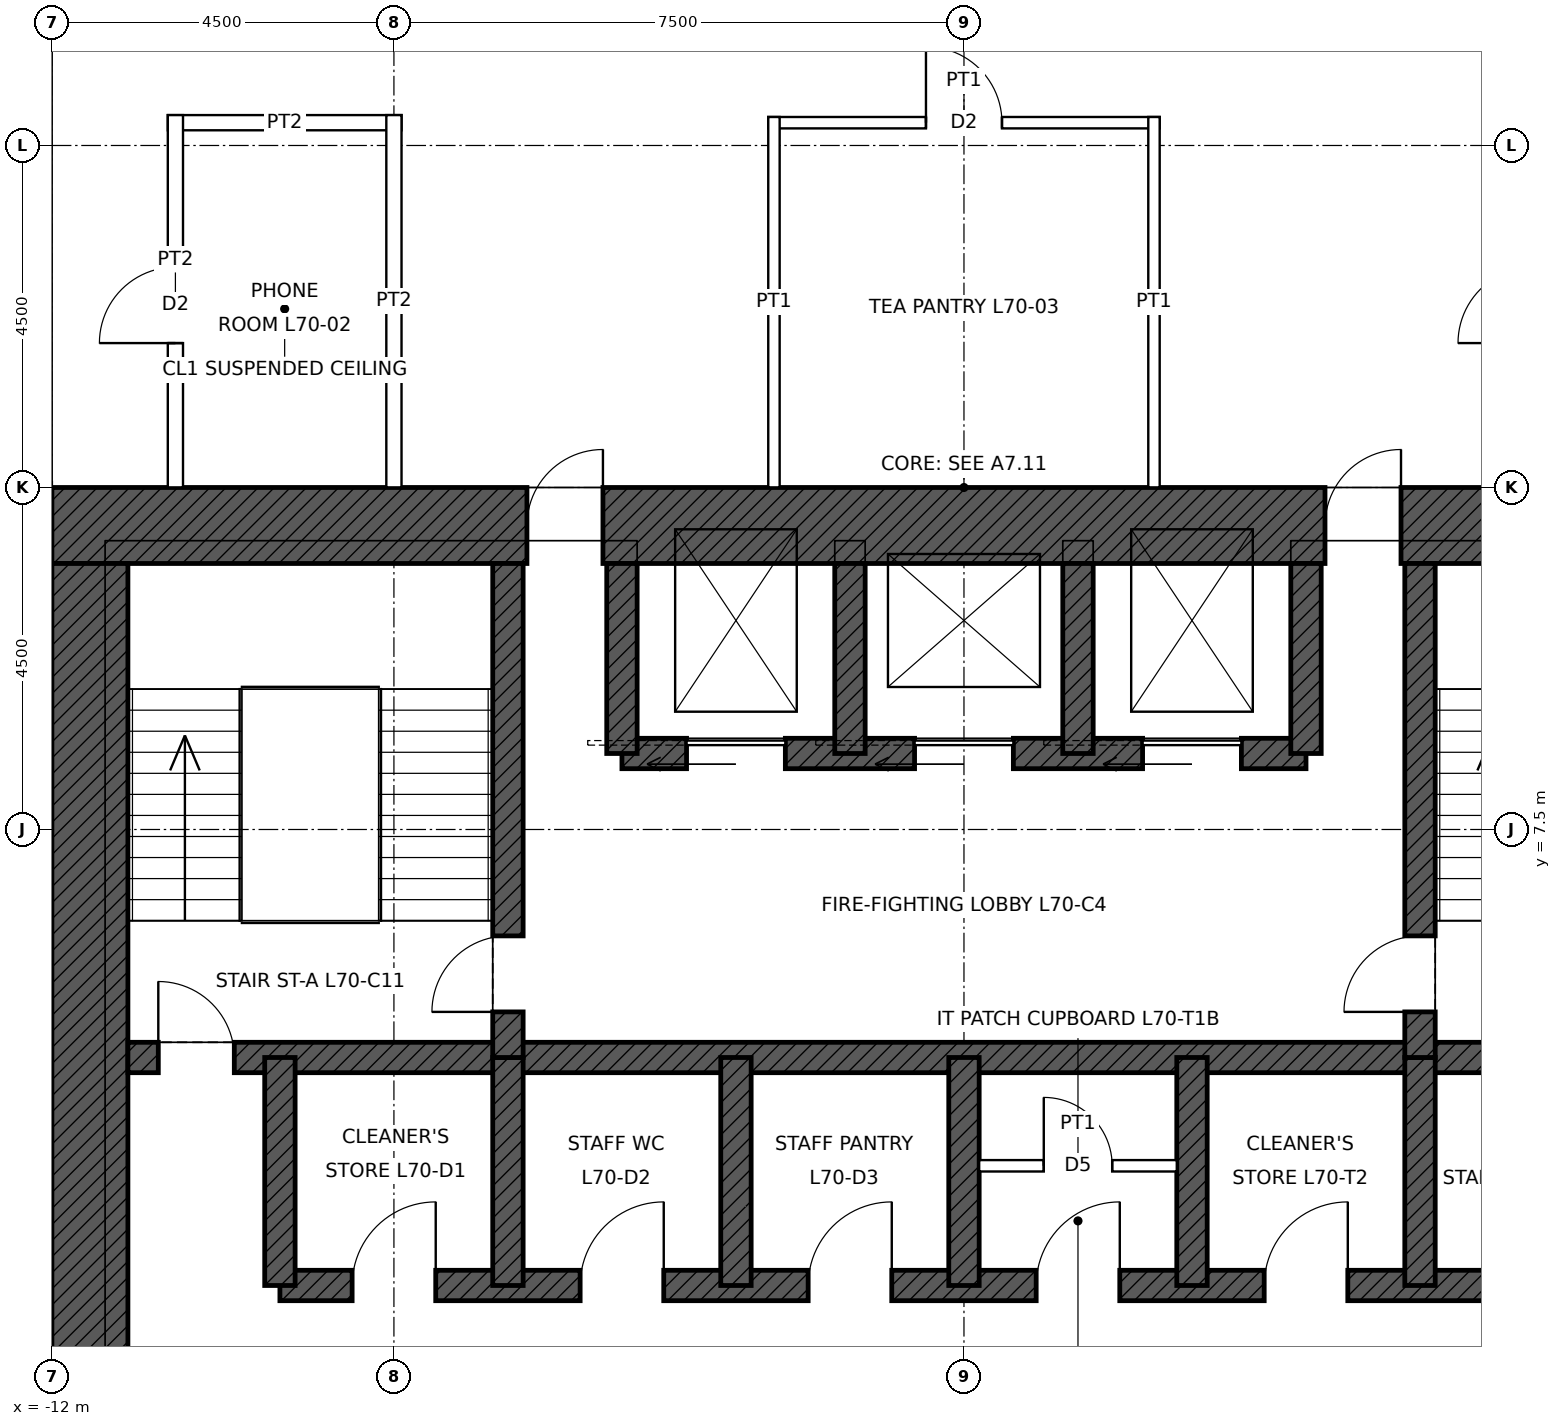
"""IFC4 building model, lengths in metres.
Left out: names, types, materials, properties, quantities, classifications, styles, units other than length and angle.
Written with IfcOpenShell. Run it as: python <this file> out.ifc"""

import sys

from ifc_helpers import new_model, si_unit, direction, frame, frame_2d, origin, place, context, subcontext, project, spatial, rectangle, extrude, element, fill, save


model = new_model("IFC4")
c1 = context("Model", 3, precision=1e-05, world=origin(), true_north=direction((0.0, 1.0)))
c2 = subcontext(c1, "Body", "Model", "MODEL_VIEW")
j1 = project(units=[si_unit("LENGTHUNIT", "METRE"), si_unit("PLANEANGLEUNIT", "RADIAN")], contexts=[c1])
p1 = place(None, origin())
s1 = spatial("IfcSite", under=j1, at=p1, CompositionType="ELEMENT")
p2 = place(p1, origin())
s2 = spatial("IfcBuilding", under=s1, at=p2, CompositionType="ELEMENT")
p3 = place(p2, frame((0.0, 0.0, 315.9)))
s3 = spatial("IfcBuildingStorey", under=s2, at=p3, CompositionType="ELEMENT", Elevation=315.9)
p4 = place(p3, frame((-12.0, 11.5, 0.0), z_axis=(0.0, 0.0, 1.0), x_axis=(1.0, 0.0, 0.0)))
e1 = element("IfcWall", 1, at=p4, inside=s3, PredefinedType="SHEAR", context=c2, shape_type="SweptSolid", body=[
    extrude(rectangle(XDim=24.0, YDim=1.0, at=frame_2d((12.0, 0.0))), origin(), (0.0, 0.0, 1.0), 4.0),
])
p5 = place(p4, frame((6.25, 0.0, 0.0)))
e2 = element("IfcOpeningElement", 2, at=p5, cuts=e1, PredefinedType="OPENING", context=c2, shape_type="SweptSolid", body=[
    extrude(rectangle(XDim=1.0, YDim=2.4, at=frame_2d((0.5, 1.2))), frame((0.0, 0.51, 0.0), z_axis=(0.0, -1.0, 0.0), x_axis=(1.0, 0.0, 0.0)), (0.0, 0.0, 1.0), 1.02),
])
p6 = place(p4, frame((16.75, 0.0, 0.0)))
e3 = element("IfcOpeningElement", 3, at=p6, cuts=e1, PredefinedType="OPENING", context=c2, shape_type="SweptSolid", body=[
    extrude(rectangle(XDim=1.0, YDim=2.4, at=frame_2d((0.5, 1.2))), frame((0.0, 0.51, 0.0), z_axis=(0.0, -1.0, 0.0), x_axis=(1.0, 0.0, 0.0)), (0.0, 0.0, 1.0), 1.02),
])
p7 = place(p3, frame((-11.5, -11.0, 0.0), z_axis=(0.0, 0.0, 1.0), x_axis=(0.0, 1.0, 0.0)))
e4 = element("IfcWall", 4, at=p7, inside=s3, PredefinedType="SHEAR", context=c2, shape_type="SweptSolid", body=[
    extrude(rectangle(XDim=22.0, YDim=1.0, at=frame_2d((11.0, 0.0))), origin(), (0.0, 0.0, 1.0), 4.0),
])
p8 = place(p7, frame((10.5, 0.0, 0.0)))
e5 = element("IfcOpeningElement", 5, at=p8, cuts=e4, PredefinedType="OPENING", context=c2, shape_type="SweptSolid", body=[
    extrude(rectangle(XDim=1.0, YDim=2.4, at=frame_2d((0.5, 1.2))), frame((0.0, 0.51, 0.0), z_axis=(0.0, -1.0, 0.0), x_axis=(1.0, 0.0, 0.0)), (0.0, 0.0, 1.0), 1.02),
])
p9 = place(p3, frame((-11.0, 4.5, 0.0), z_axis=(0.0, 0.0, 1.0), x_axis=(1.0, 0.0, 0.0)))
e6 = element("IfcWall", 6, at=p9, inside=s3, PredefinedType="SHEAR", context=c2, shape_type="SweptSolid", body=[
    extrude(rectangle(XDim=22.0, YDim=0.4, at=frame_2d((11.0, 0.0))), origin(), (0.0, 0.0, 1.0), 4.0),
])
p10 = place(p9, frame((0.4, 0.0, 0.0)))
e7 = element("IfcOpeningElement", 7, at=p10, cuts=e6, PredefinedType="OPENING", context=c2, shape_type="SweptSolid", body=[
    extrude(rectangle(XDim=1.0, YDim=2.1, at=frame_2d((0.5, 1.05))), frame((0.0, 0.21, 0.0), z_axis=(0.0, -1.0, 0.0), x_axis=(1.0, 0.0, 0.0)), (0.0, 0.0, 1.0), 0.42),
])
p11 = place(p9, frame((20.6, 0.0, 0.0)))
e8 = element("IfcOpeningElement", 8, at=p11, cuts=e6, PredefinedType="OPENING", context=c2, shape_type="SweptSolid", body=[
    extrude(rectangle(XDim=1.0, YDim=2.1, at=frame_2d((0.5, 1.05))), frame((0.0, 0.21, 0.0), z_axis=(0.0, -1.0, 0.0), x_axis=(1.0, 0.0, 0.0)), (0.0, 0.0, 1.0), 0.42),
])
p12 = place(p3, frame((-9.0, 1.5, 0.0), z_axis=(0.0, 0.0, 1.0), x_axis=(1.0, 0.0, 0.0)))
e9 = element("IfcWall", 9, at=p12, inside=s3, PredefinedType="SHEAR", context=c2, shape_type="SweptSolid", body=[
    extrude(rectangle(XDim=18.0, YDim=0.4, at=frame_2d((9.0, 0.0))), origin(), (0.0, 0.0, 1.0), 4.0),
])
p13 = place(p12, frame((0.95, 0.0, 0.0)))
e10 = element("IfcOpeningElement", 10, at=p13, cuts=e9, PredefinedType="OPENING", context=c2, shape_type="SweptSolid", body=[
    extrude(rectangle(XDim=1.1, YDim=2.1, at=frame_2d((0.55, 1.05))), frame((0.0, 0.21, 0.0), z_axis=(0.0, -1.0, 0.0), x_axis=(1.0, 0.0, 0.0)), (0.0, 0.0, 1.0), 0.42),
])
p14 = place(p12, frame((3.95, 0.0, 0.0)))
e11 = element("IfcOpeningElement", 11, at=p14, cuts=e9, PredefinedType="OPENING", context=c2, shape_type="SweptSolid", body=[
    extrude(rectangle(XDim=1.1, YDim=2.1, at=frame_2d((0.55, 1.05))), frame((0.0, 0.21, 0.0), z_axis=(0.0, -1.0, 0.0), x_axis=(1.0, 0.0, 0.0)), (0.0, 0.0, 1.0), 0.42),
])
p15 = place(p12, frame((6.95, 0.0, 0.0)))
e12 = element("IfcOpeningElement", 12, at=p15, cuts=e9, PredefinedType="OPENING", context=c2, shape_type="SweptSolid", body=[
    extrude(rectangle(XDim=1.1, YDim=2.1, at=frame_2d((0.55, 1.05))), frame((0.0, 0.21, 0.0), z_axis=(0.0, -1.0, 0.0), x_axis=(1.0, 0.0, 0.0)), (0.0, 0.0, 1.0), 0.42),
])
p16 = place(p12, frame((9.95, 0.0, 0.0)))
e13 = element("IfcOpeningElement", 13, at=p16, cuts=e9, PredefinedType="OPENING", context=c2, shape_type="SweptSolid", body=[
    extrude(rectangle(XDim=1.1, YDim=2.1, at=frame_2d((0.55, 1.05))), frame((0.0, 0.21, 0.0), z_axis=(0.0, -1.0, 0.0), x_axis=(1.0, 0.0, 0.0)), (0.0, 0.0, 1.0), 0.42),
])
p17 = place(p12, frame((12.95, 0.0, 0.0)))
e14 = element("IfcOpeningElement", 14, at=p17, cuts=e9, PredefinedType="OPENING", context=c2, shape_type="SweptSolid", body=[
    extrude(rectangle(XDim=1.1, YDim=2.1, at=frame_2d((0.55, 1.05))), frame((0.0, 0.21, 0.0), z_axis=(0.0, -1.0, 0.0), x_axis=(1.0, 0.0, 0.0)), (0.0, 0.0, 1.0), 0.42),
])
p18 = place(p12, frame((15.95, 0.0, 0.0)))
e15 = element("IfcOpeningElement", 15, at=p18, cuts=e9, PredefinedType="OPENING", context=c2, shape_type="SweptSolid", body=[
    extrude(rectangle(XDim=1.1, YDim=2.1, at=frame_2d((0.55, 1.05))), frame((0.0, 0.21, 0.0), z_axis=(0.0, -1.0, 0.0), x_axis=(1.0, 0.0, 0.0)), (0.0, 0.0, 1.0), 0.42),
])
p19 = place(p3, frame((-4.5, 8.5, 0.0), z_axis=(0.0, 0.0, 1.0), x_axis=(1.0, 0.0, 0.0)))
e16 = element("IfcWall", 16, at=p19, inside=s3, PredefinedType="SHEAR", context=c2, shape_type="SweptSolid", body=[
    extrude(rectangle(XDim=9.0, YDim=0.4, at=frame_2d((4.5, 0.0))), origin(), (0.0, 0.0, 1.0), 4.0),
])
p20 = place(p19, frame((0.85, 0.0, 0.0)))
e17 = element("IfcOpeningElement", 17, at=p20, cuts=e16, PredefinedType="OPENING", context=c2, shape_type="SweptSolid", body=[
    extrude(rectangle(XDim=1.3, YDim=2.4, at=frame_2d((0.65, 1.2))), frame((0.0, 0.21, 0.0), z_axis=(0.0, -1.0, 0.0), x_axis=(1.0, 0.0, 0.0)), (0.0, 0.0, 1.0), 0.42),
])
p21 = place(p19, frame((6.85, 0.0, 0.0)))
e18 = element("IfcOpeningElement", 18, at=p21, cuts=e16, PredefinedType="OPENING", context=c2, shape_type="SweptSolid", body=[
    extrude(rectangle(XDim=1.3, YDim=2.4, at=frame_2d((0.65, 1.2))), frame((0.0, 0.21, 0.0), z_axis=(0.0, -1.0, 0.0), x_axis=(1.0, 0.0, 0.0)), (0.0, 0.0, 1.0), 0.42),
])
p22 = place(p19, frame((3.85, 0.0, 0.0)))
e19 = element("IfcOpeningElement", 19, at=p22, cuts=e16, PredefinedType="OPENING", context=c2, shape_type="SweptSolid", body=[
    extrude(rectangle(XDim=1.3, YDim=2.4, at=frame_2d((0.65, 1.2))), frame((0.0, 0.21, 0.0), z_axis=(0.0, -1.0, 0.0), x_axis=(1.0, 0.0, 0.0)), (0.0, 0.0, 1.0), 0.42),
])
for number, where, z_axis, x_axis in (
    (20, (-9.0, 1.5, 0.0), (0.0, 0.0, 1.0), (0.0, 1.0, 0.0)),
    (21, (-6.0, 1.5, 0.0), (0.0, 0.0, 1.0), (0.0, 1.0, 0.0)),
    (22, (-3.0, 1.5, 0.0), (0.0, 0.0, 1.0), (0.0, 1.0, 0.0)),
    (23, (0.0, 1.5, 0.0), (0.0, 0.0, 1.0), (0.0, 1.0, 0.0)),
    (24, (3.0, 1.5, 0.0), (0.0, 0.0, 1.0), (0.0, 1.0, 0.0)),
    (25, (6.0, 1.5, 0.0), (0.0, 0.0, 1.0), (0.0, 1.0, 0.0)),
):
    element("IfcWall", number, at=place(p3, frame(where, z_axis=z_axis, x_axis=x_axis)), inside=s3, PredefinedType="SHEAR", context=c2, shape_type="SweptSolid", body=[
        extrude(rectangle(XDim=3.0, YDim=0.4, at=frame_2d((1.5, 0.0))), origin(), (0.0, 0.0, 1.0), 4.0),
    ])
p23 = place(p3, frame((-6.0, 4.5, 0.0), z_axis=(0.0, 0.0, 1.0), x_axis=(0.0, 1.0, 0.0)))
e26 = element("IfcWall", 26, at=p23, inside=s3, PredefinedType="SHEAR", context=c2, shape_type="SweptSolid", body=[
    extrude(rectangle(XDim=6.5, YDim=0.4, at=frame_2d((3.25, 0.0))), origin(), (0.0, 0.0, 1.0), 4.0),
])
p24 = place(p23, frame((0.6, 0.0, 0.0)))
e27 = element("IfcOpeningElement", 27, at=p24, cuts=e26, PredefinedType="OPENING", context=c2, shape_type="SweptSolid", body=[
    extrude(rectangle(XDim=1.0, YDim=2.1, at=frame_2d((0.5, 1.05))), frame((0.0, 0.21, 0.0), z_axis=(0.0, -1.0, 0.0), x_axis=(1.0, 0.0, 0.0)), (0.0, 0.0, 1.0), 0.42),
])
p25 = place(p3, frame((6.0, 4.5, 0.0), z_axis=(0.0, 0.0, 1.0), x_axis=(0.0, 1.0, 0.0)))
e28 = element("IfcWall", 28, at=p25, inside=s3, PredefinedType="SHEAR", context=c2, shape_type="SweptSolid", body=[
    extrude(rectangle(XDim=6.5, YDim=0.4, at=frame_2d((3.25, 0.0))), origin(), (0.0, 0.0, 1.0), 4.0),
])
p26 = place(p25, frame((0.6, 0.0, 0.0)))
e29 = element("IfcOpeningElement", 29, at=p26, cuts=e28, PredefinedType="OPENING", context=c2, shape_type="SweptSolid", body=[
    extrude(rectangle(XDim=1.0, YDim=2.1, at=frame_2d((0.5, 1.05))), frame((0.0, 0.21, 0.0), z_axis=(0.0, -1.0, 0.0), x_axis=(1.0, 0.0, 0.0)), (0.0, 0.0, 1.0), 0.42),
])
for number, where, z_axis, x_axis in (
    (30, (-4.5, 8.5, 0.0), (0.0, 0.0, 1.0), (0.0, 1.0, 0.0)),
    (31, (4.5, 8.5, 0.0), (0.0, 0.0, 1.0), (0.0, 1.0, 0.0)),
    (32, (-1.5, 8.5, 0.0), (0.0, 0.0, 1.0), (0.0, 1.0, 0.0)),
    (33, (1.5, 8.5, 0.0), (0.0, 0.0, 1.0), (0.0, 1.0, 0.0)),
):
    element("IfcWall", number, at=place(p3, frame(where, z_axis=z_axis, x_axis=x_axis)), inside=s3, PredefinedType="SHEAR", context=c2, shape_type="SweptSolid", body=[
        extrude(rectangle(XDim=2.5, YDim=0.4, at=frame_2d((1.25, 0.0))), origin(), (0.0, 0.0, 1.0), 4.0),
    ])
p27 = place(p3, frame((-13.575, 12.0, 0.0), z_axis=(0.0, 0.0, 1.0), x_axis=(1.0, 0.0, 0.0)))
e34 = element("IfcWall", 34, at=p27, inside=s3, PredefinedType="PARTITIONING", context=c2, shape_type="SweptSolid", body=[
    extrude(rectangle(XDim=1.575, YDim=0.15, at=frame_2d((0.788, 0.0))), origin(), (0.0, 0.0, 1.0), 3.85),
])
p28 = place(p3, frame((-10.475, 16.8, 0.0), z_axis=(0.0, 0.0, 1.0), x_axis=(1.0, 0.0, 0.0)))
e35 = element("IfcWall", 35, at=p28, inside=s3, PredefinedType="PARTITIONING", context=c2, shape_type="SweptSolid", body=[
    extrude(rectangle(XDim=3.075, YDim=0.2, at=frame_2d((1.538, 0.0))), origin(), (0.0, 0.0, 1.0), 3.85),
])
p29 = place(p3, frame((-2.575, 16.8, 0.0), z_axis=(0.0, 0.0, 1.0), x_axis=(1.0, 0.0, 0.0)))
e36 = element("IfcWall", 36, at=p29, inside=s3, PredefinedType="PARTITIONING", context=c2, shape_type="SweptSolid", body=[
    extrude(rectangle(XDim=5.15, YDim=0.15, at=frame_2d((2.575, 0.0))), origin(), (0.0, 0.0, 1.0), 3.85),
])
p30 = place(p29, frame((2.075, 0.0, 0.0)))
e37 = element("IfcOpeningElement", 37, at=p30, cuts=e36, PredefinedType="OPENING", context=c2, shape_type="SweptSolid", body=[
    extrude(rectangle(XDim=1.0, YDim=2.1, at=frame_2d((0.5, 1.05))), frame((0.0, 0.085, 0.0), z_axis=(0.0, -1.0, 0.0), x_axis=(1.0, 0.0, 0.0)), (0.0, 0.0, 1.0), 0.17),
])
p31 = place(p3, frame((-10.375, 12.0, 0.0), z_axis=(0.0, 0.0, 1.0), x_axis=(0.0, 1.0, 0.0)))
e38 = element("IfcWall", 38, at=p31, inside=s3, PredefinedType="PARTITIONING", context=c2, shape_type="SweptSolid", body=[
    extrude(rectangle(XDim=4.9, YDim=0.2, at=frame_2d((2.45, 0.0))), origin(), (0.0, 0.0, 1.0), 3.85),
])
p32 = place(p31, frame((1.9, 0.0, 0.0)))
e39 = element("IfcOpeningElement", 39, at=p32, cuts=e38, PredefinedType="OPENING", context=c2, shape_type="SweptSolid", body=[
    extrude(rectangle(XDim=1.0, YDim=2.1, at=frame_2d((0.5, 1.05))), frame((0.0, 0.11, 0.0), z_axis=(0.0, -1.0, 0.0), x_axis=(1.0, 0.0, 0.0)), (0.0, 0.0, 1.0), 0.22),
])
p33 = place(p3, frame((-7.5, 12.0, 0.0), z_axis=(0.0, 0.0, 1.0), x_axis=(0.0, 1.0, 0.0)))
e40 = element("IfcWall", 40, at=p33, inside=s3, PredefinedType="PARTITIONING", context=c2, shape_type="SweptSolid", body=[
    extrude(rectangle(XDim=4.9, YDim=0.2, at=frame_2d((2.45, 0.0))), origin(), (0.0, 0.0, 1.0), 3.243),
])
for number, where, z_axis, x_axis in (
    (41, (-2.5, 12.0, 0.0), (0.0, 0.0, 1.0), (0.0, 1.0, 0.0)),
    (42, (2.5, 12.0, 0.0), (0.0, 0.0, 1.0), (0.0, 1.0, 0.0)),
):
    element("IfcWall", number, at=place(p3, frame(where, z_axis=z_axis, x_axis=x_axis)), inside=s3, PredefinedType="PARTITIONING", context=c2, shape_type="SweptSolid", body=[
        extrude(rectangle(XDim=4.875, YDim=0.15, at=frame_2d((2.438, 0.0))), origin(), (0.0, 0.0, 1.0), 3.85),
    ])
p34 = place(p3, frame((0.2, 3.075, 0.0), z_axis=(0.0, 0.0, 1.0), x_axis=(1.0, 0.0, 0.0)))
e43 = element("IfcWall", 43, at=p34, inside=s3, PredefinedType="PARTITIONING", context=c2, shape_type="SweptSolid", body=[
    extrude(rectangle(XDim=2.6, YDim=0.15, at=frame_2d((1.3, 0.0))), origin(), (0.0, 0.0, 1.0), 3.75),
])
p35 = place(p34, frame((0.85, 0.0, 0.0)))
e44 = element("IfcOpeningElement", 44, at=p35, cuts=e43, PredefinedType="OPENING", context=c2, shape_type="SweptSolid", body=[
    extrude(rectangle(XDim=0.9, YDim=2.1, at=frame_2d((0.45, 1.05))), frame((0.0, 0.085, 0.0), z_axis=(0.0, -1.0, 0.0), x_axis=(1.0, 0.0, 0.0)), (0.0, 0.0, 1.0), 0.17),
])
p36 = place(p10, origin())
e45 = element("IfcDoor", 45, at=p36, inside=s3, OperationType="SINGLE_SWING_LEFT", PredefinedType="DOOR", context=c2, shape_type="SweptSolid", body=[
    extrude(rectangle(XDim=1.0, YDim=2.1, at=frame_2d((0.5, 1.05))), frame((0.0, 0.025, 0.0), z_axis=(0.0, -1.0, 0.0), x_axis=(1.0, 0.0, 0.0)), (0.0, 0.0, 1.0), 0.05),
])
fill(e7, e45)
p37 = place(p24, origin())
e46 = element("IfcDoor", 46, at=p37, inside=s3, OperationType="SINGLE_SWING_LEFT", PredefinedType="DOOR", context=c2, shape_type="SweptSolid", body=[
    extrude(rectangle(XDim=1.0, YDim=2.1, at=frame_2d((0.5, 1.05))), frame((0.0, 0.025, 0.0), z_axis=(0.0, -1.0, 0.0), x_axis=(1.0, 0.0, 0.0)), (0.0, 0.0, 1.0), 0.05),
])
fill(e27, e46)
p38 = place(p26, origin())
e47 = element("IfcDoor", 47, at=p38, inside=s3, OperationType="SINGLE_SWING_LEFT", PredefinedType="DOOR", context=c2, shape_type="SweptSolid", body=[
    extrude(rectangle(XDim=1.0, YDim=2.1, at=frame_2d((0.5, 1.05))), frame((0.0, 0.025, 0.0), z_axis=(0.0, -1.0, 0.0), x_axis=(1.0, 0.0, 0.0)), (0.0, 0.0, 1.0), 0.05),
])
fill(e29, e47)
p39 = place(p5, origin())
e48 = element("IfcDoor", 48, at=p39, inside=s3, OperationType="SINGLE_SWING_RIGHT", PredefinedType="DOOR", context=c2, shape_type="SweptSolid", body=[
    extrude(rectangle(XDim=1.0, YDim=2.4, at=frame_2d((0.5, 1.2))), frame((0.0, 0.485, 0.0), z_axis=(0.0, -1.0, 0.0), x_axis=(1.0, 0.0, 0.0)), (0.0, 0.0, 1.0), 0.05),
])
fill(e2, e48)
p40 = place(p6, origin())
e49 = element("IfcDoor", 49, at=p40, inside=s3, OperationType="SINGLE_SWING_RIGHT", PredefinedType="DOOR", context=c2, shape_type="SweptSolid", body=[
    extrude(rectangle(XDim=1.0, YDim=2.4, at=frame_2d((0.5, 1.2))), frame((0.0, 0.485, 0.0), z_axis=(0.0, -1.0, 0.0), x_axis=(1.0, 0.0, 0.0)), (0.0, 0.0, 1.0), 0.05),
])
fill(e3, e49)
p41 = place(p20, origin())
e50 = element("IfcDoor", 50, at=p41, inside=s3, OperationType="SLIDING_TO_LEFT", PredefinedType="DOOR", context=c2, shape_type="SweptSolid", body=[
    extrude(rectangle(XDim=1.3, YDim=2.4, at=frame_2d((0.65, 1.2))), frame((0.0, 0.025, 0.0), z_axis=(0.0, -1.0, 0.0), x_axis=(1.0, 0.0, 0.0)), (0.0, 0.0, 1.0), 0.05),
])
fill(e17, e50)
p42 = place(p21, origin())
e51 = element("IfcDoor", 51, at=p42, inside=s3, OperationType="SLIDING_TO_LEFT", PredefinedType="DOOR", context=c2, shape_type="SweptSolid", body=[
    extrude(rectangle(XDim=1.3, YDim=2.4, at=frame_2d((0.65, 1.2))), frame((0.0, 0.025, 0.0), z_axis=(0.0, -1.0, 0.0), x_axis=(1.0, 0.0, 0.0)), (0.0, 0.0, 1.0), 0.05),
])
fill(e18, e51)
p43 = place(p22, origin())
e52 = element("IfcDoor", 52, at=p43, inside=s3, OperationType="SLIDING_TO_LEFT", PredefinedType="DOOR", context=c2, shape_type="SweptSolid", body=[
    extrude(rectangle(XDim=1.3, YDim=2.4, at=frame_2d((0.65, 1.2))), frame((0.0, 0.025, 0.0), z_axis=(0.0, -1.0, 0.0), x_axis=(1.0, 0.0, 0.0)), (0.0, 0.0, 1.0), 0.05),
])
fill(e19, e52)
p44 = place(p13, origin())
e53 = element("IfcDoor", 53, at=p44, inside=s3, OperationType="SINGLE_SWING_RIGHT", PredefinedType="DOOR", context=c2, shape_type="SweptSolid", body=[
    extrude(rectangle(XDim=1.1, YDim=2.1, at=frame_2d((0.55, 1.05))), frame((0.0, 0.025, 0.0), z_axis=(0.0, -1.0, 0.0), x_axis=(1.0, 0.0, 0.0)), (0.0, 0.0, 1.0), 0.05),
])
fill(e10, e53)
p45 = place(p14, origin())
e54 = element("IfcDoor", 54, at=p45, inside=s3, OperationType="SINGLE_SWING_RIGHT", PredefinedType="DOOR", context=c2, shape_type="SweptSolid", body=[
    extrude(rectangle(XDim=1.1, YDim=2.1, at=frame_2d((0.55, 1.05))), frame((0.0, 0.025, 0.0), z_axis=(0.0, -1.0, 0.0), x_axis=(1.0, 0.0, 0.0)), (0.0, 0.0, 1.0), 0.05),
])
fill(e11, e54)
p46 = place(p15, origin())
e55 = element("IfcDoor", 55, at=p46, inside=s3, OperationType="SINGLE_SWING_RIGHT", PredefinedType="DOOR", context=c2, shape_type="SweptSolid", body=[
    extrude(rectangle(XDim=1.1, YDim=2.1, at=frame_2d((0.55, 1.05))), frame((0.0, 0.025, 0.0), z_axis=(0.0, -1.0, 0.0), x_axis=(1.0, 0.0, 0.0)), (0.0, 0.0, 1.0), 0.05),
])
fill(e12, e55)
p47 = place(p16, origin())
e56 = element("IfcDoor", 56, at=p47, inside=s3, OperationType="SINGLE_SWING_RIGHT", PredefinedType="DOOR", context=c2, shape_type="SweptSolid", body=[
    extrude(rectangle(XDim=1.1, YDim=2.1, at=frame_2d((0.55, 1.05))), frame((0.0, 0.025, 0.0), z_axis=(0.0, -1.0, 0.0), x_axis=(1.0, 0.0, 0.0)), (0.0, 0.0, 1.0), 0.05),
])
fill(e13, e56)
p48 = place(p35, origin())
e57 = element("IfcDoor", 57, at=p48, inside=s3, OperationType="SINGLE_SWING_LEFT", PredefinedType="DOOR", context=c2, shape_type="SweptSolid", body=[
    extrude(rectangle(XDim=0.9, YDim=2.1, at=frame_2d((0.45, 1.05))), frame((0.0, 0.025, 0.0), z_axis=(0.0, -1.0, 0.0), x_axis=(1.0, 0.0, 0.0)), (0.0, 0.0, 1.0), 0.05),
])
fill(e44, e57)
p49 = place(p17, origin())
e58 = element("IfcDoor", 58, at=p49, inside=s3, OperationType="SINGLE_SWING_RIGHT", PredefinedType="DOOR", context=c2, shape_type="SweptSolid", body=[
    extrude(rectangle(XDim=1.1, YDim=2.1, at=frame_2d((0.55, 1.05))), frame((0.0, 0.025, 0.0), z_axis=(0.0, -1.0, 0.0), x_axis=(1.0, 0.0, 0.0)), (0.0, 0.0, 1.0), 0.05),
])
fill(e14, e58)
p50 = place(p32, origin())
e59 = element("IfcDoor", 59, at=p50, inside=s3, OperationType="SINGLE_SWING_LEFT", PredefinedType="DOOR", context=c2, shape_type="SweptSolid", body=[
    extrude(rectangle(XDim=1.0, YDim=2.1, at=frame_2d((0.5, 1.05))), frame((0.0, 0.025, 0.0), z_axis=(0.0, -1.0, 0.0), x_axis=(1.0, 0.0, 0.0)), (0.0, 0.0, 1.0), 0.05),
])
fill(e39, e59)
p51 = place(p30, origin())
e60 = element("IfcDoor", 60, at=p51, inside=s3, OperationType="SINGLE_SWING_LEFT", PredefinedType="DOOR", context=c2, shape_type="SweptSolid", body=[
    extrude(rectangle(XDim=1.0, YDim=2.1, at=frame_2d((0.5, 1.05))), frame((0.0, 0.025, 0.0), z_axis=(0.0, -1.0, 0.0), x_axis=(1.0, 0.0, 0.0)), (0.0, 0.0, 1.0), 0.05),
])
fill(e37, e60)
save(model, sys.argv[1])
